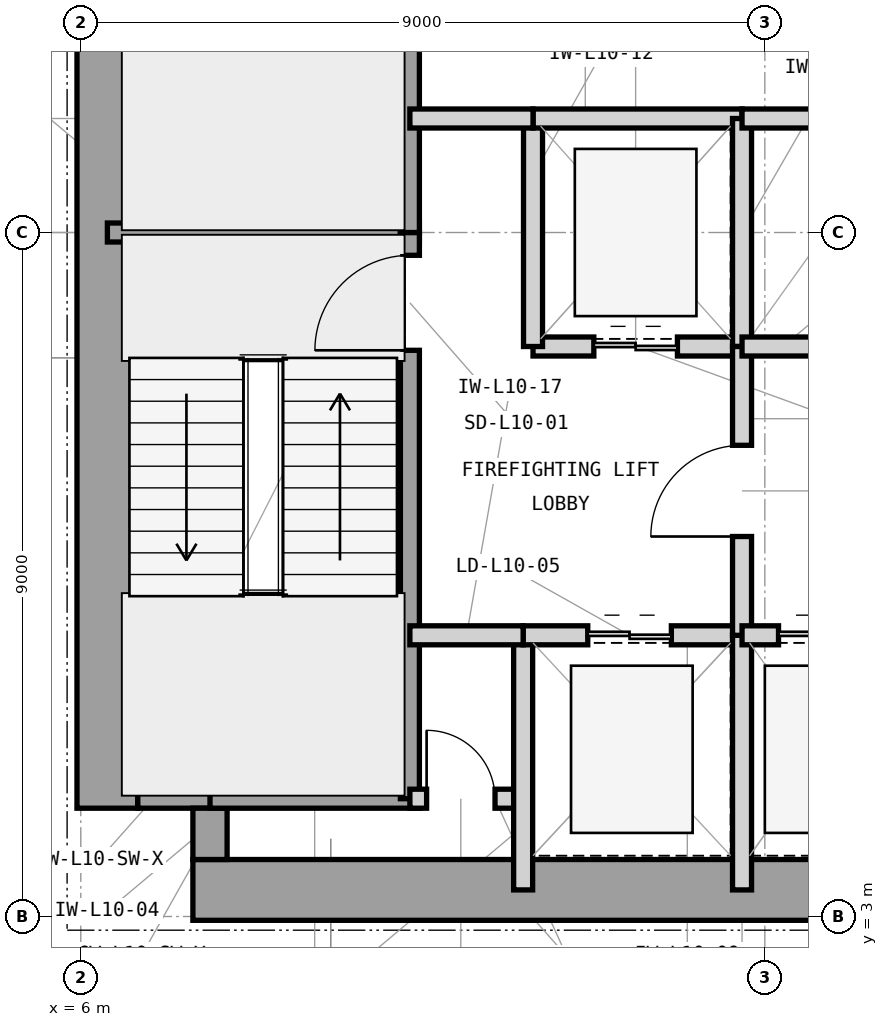
"""IFC4 building model, lengths in metres.
Left out: names, types, materials, properties, quantities, classifications, styles, units other than length and angle.
Written with IfcOpenShell. Run it as: python <this file> out.ifc"""

import sys

from ifc_helpers import new_model, si_unit, direction, frame, frame_2d, origin, place, context, subcontext, project, spatial, rectangle, extrude, element, fill, save


model = new_model("IFC4")
c1 = context("Model", 3, precision=1e-05, world=origin(), true_north=direction((0.0, 1.0)))
c2 = subcontext(c1, "Body", "Model", "MODEL_VIEW")
j1 = project(units=[si_unit("LENGTHUNIT", "METRE"), si_unit("PLANEANGLEUNIT", "RADIAN")], contexts=[c1])
p1 = place(None, origin())
s1 = spatial("IfcSite", under=j1, at=p1, CompositionType="ELEMENT")
p2 = place(p1, origin())
s2 = spatial("IfcBuilding", under=s1, at=p2, CompositionType="ELEMENT")
p3 = place(p2, frame((0.0, 0.0, 46.8)))
s3 = spatial("IfcBuildingStorey", under=s2, at=p3, CompositionType="ELEMENT", Elevation=46.8)
p4 = place(p3, frame((7.475, 3.35, 0.0), z_axis=(0.0, 0.0, 1.0), x_axis=(1.0, 0.0, 0.0)))
e1 = element("IfcWall", 1, at=p4, inside=s3, PredefinedType="SHEAR", context=c2, shape_type="SweptSolid", body=[
    extrude(rectangle(XDim=16.575, YDim=0.8, at=frame_2d((8.288, 0.0))), origin(), (0.0, 0.0, 1.0), 4.2),
])
p5 = place(p3, frame((6.35, 4.425, 0.0), z_axis=(0.0, 0.0, 1.0), x_axis=(0.0, 1.0, 0.0)))
e2 = element("IfcWall", 2, at=p5, inside=s3, PredefinedType="SHEAR", context=c2, shape_type="SweptSolid", body=[
    extrude(rectangle(XDim=15.15, YDim=0.8, at=frame_2d((7.575, 0.0))), origin(), (0.0, 0.0, 1.0), 4.2),
])
p6 = place(p3, frame((6.75, 4.65, 0.0), z_axis=(0.0, 0.0, 1.0), x_axis=(1.0, 0.0, 0.0)))
e3 = element("IfcWall", 3, at=p6, inside=s3, PredefinedType="SHEAR", context=c2, shape_type="SweptSolid", body=[
    extrude(rectangle(XDim=1.175, YDim=0.45, at=frame_2d((0.587, 0.0))), origin(), (0.0, 0.0, 1.0), 4.2),
])
p7 = place(p3, frame((7.7, 3.75, 0.0), z_axis=(0.0, 0.0, 1.0), x_axis=(0.0, 1.0, 0.0)))
e4 = element("IfcWall", 4, at=p7, inside=s3, PredefinedType="SHEAR", context=c2, shape_type="SweptSolid", body=[
    extrude(rectangle(XDim=0.675, YDim=0.45, at=frame_2d((0.337, 0.0))), origin(), (0.0, 0.0, 1.0), 4.2),
])
p8 = place(p3, frame((6.35, 12.0, 0.0), z_axis=(0.0, 0.0, 1.0), x_axis=(1.0, 0.0, 0.0)))
e5 = element("IfcWall", 5, at=p8, inside=s3, PredefinedType="SHEAR", context=c2, shape_type="SweptSolid", body=[
    extrude(rectangle(XDim=4.105, YDim=0.25, at=frame_2d((2.052, 0.0))), origin(), (0.0, 0.0, 1.0), 4.2),
])
p9 = place(p3, frame((7.7, 4.55, 0.0), z_axis=(0.0, 0.0, 1.0), x_axis=(1.0, 0.0, 0.0)))
e6 = element("IfcWall", 6, at=p9, inside=s3, PredefinedType="SHEAR", context=c2, shape_type="SweptSolid", body=[
    extrude(rectangle(XDim=2.755, YDim=0.25, at=frame_2d((1.377, 0.0))), origin(), (0.0, 0.0, 1.0), 4.2),
])
p10 = place(p3, frame((10.33, 4.55, 0.0), z_axis=(0.0, 0.0, 1.0), x_axis=(0.0, 1.0, 0.0)))
e7 = element("IfcWall", 7, at=p10, inside=s3, PredefinedType="SHEAR", context=c2, shape_type="SweptSolid", body=[
    extrude(rectangle(XDim=7.45, YDim=0.25, at=frame_2d((3.725, 0.0))), origin(), (0.0, 0.0, 1.0), 4.2),
])
p11 = place(p10, frame((5.9, 0.0, 0.0)))
e8 = element("IfcOpeningElement", 8, at=p11, cuts=e7, PredefinedType="OPENING", context=c2, shape_type="SweptSolid", body=[
    extrude(rectangle(XDim=1.25, YDim=2.2, at=frame_2d((0.625, 1.1))), frame((0.0, 0.135, 0.0), z_axis=(0.0, -1.0, 0.0), x_axis=(1.0, 0.0, 0.0)), (0.0, 0.0, 1.0), 0.27),
])
p12 = place(p3, frame((10.33, 12.0, 0.0), z_axis=(0.0, 0.0, 1.0), x_axis=(0.0, 1.0, 0.0)))
e9 = element("IfcWall", 9, at=p12, inside=s3, PredefinedType="SHEAR", context=c2, shape_type="SweptSolid", body=[
    extrude(rectangle(XDim=7.45, YDim=0.25, at=frame_2d((3.725, 0.0))), origin(), (0.0, 0.0, 1.0), 4.2),
])
p13 = place(p12, frame((5.85, 0.0, 0.0)))
e10 = element("IfcOpeningElement", 10, at=p13, cuts=e9, PredefinedType="OPENING", context=c2, shape_type="SweptSolid", body=[
    extrude(rectangle(XDim=1.25, YDim=2.2, at=frame_2d((0.625, 1.1))), frame((0.0, 0.135, 0.0), z_axis=(0.0, -1.0, 0.0), x_axis=(1.0, 0.0, 0.0)), (0.0, 0.0, 1.0), 0.27),
])
p14 = place(p3, frame((10.33, 4.55, 0.0), z_axis=(0.0, 0.0, 1.0), x_axis=(1.0, 0.0, 0.0)))
e11 = element("IfcWall", 11, at=p14, inside=s3, PredefinedType="PARTITIONING", context=c2, shape_type="SweptSolid", body=[
    extrude(rectangle(XDim=1.49, YDim=0.25, at=frame_2d((0.745, 0.0))), origin(), (0.0, 0.0, 1.0), 3.97),
])
p15 = place(p14, frame((0.22, 0.0, 0.0)))
e12 = element("IfcOpeningElement", 12, at=p15, cuts=e11, PredefinedType="OPENING", context=c2, shape_type="SweptSolid", body=[
    extrude(rectangle(XDim=0.9, YDim=2.1, at=frame_2d((0.45, 1.05))), frame((0.0, 0.135, 0.0), z_axis=(0.0, -1.0, 0.0), x_axis=(1.0, 0.0, 0.0)), (0.0, 0.0, 1.0), 0.27),
])
p16 = place(p3, frame((11.82, 3.35, 0.0), z_axis=(0.0, 0.0, 1.0), x_axis=(0.0, 1.0, 0.0)))
e13 = element("IfcWall", 13, at=p16, inside=s3, PredefinedType="PARTITIONING", context=c2, shape_type="SweptSolid", body=[
    extrude(rectangle(XDim=3.35, YDim=0.25, at=frame_2d((1.675, 0.0))), origin(), (0.0, 0.0, 1.0), 3.97),
])
p17 = place(p3, frame((11.82, 6.7, 0.0), z_axis=(0.0, 0.0, 1.0), x_axis=(1.0, 0.0, 0.0)))
e14 = element("IfcWall", 14, at=p17, inside=s3, PredefinedType="PARTITIONING", context=c2, shape_type="SweptSolid", body=[
    extrude(rectangle(XDim=2.88, YDim=0.25, at=frame_2d((1.44, 0.0))), origin(), (0.0, 0.0, 1.0), 3.426),
])
p18 = place(p17, frame((0.85, 0.0, 0.0)))
e15 = element("IfcOpeningElement", 15, at=p18, cuts=e14, PredefinedType="OPENING", context=c2, shape_type="SweptSolid", body=[
    extrude(rectangle(XDim=1.1, YDim=2.25, at=frame_2d((0.55, 1.125))), frame((0.0, 0.135, 0.0), z_axis=(0.0, -1.0, 0.0), x_axis=(1.0, 0.0, 0.0)), (0.0, 0.0, 1.0), 0.27),
])
p19 = place(p3, frame((14.7, 3.35, 0.0), z_axis=(0.0, 0.0, 1.0), x_axis=(0.0, 1.0, 0.0)))
e16 = element("IfcWall", 16, at=p19, inside=s3, PredefinedType="PARTITIONING", context=c2, shape_type="SweptSolid", body=[
    extrude(rectangle(XDim=3.35, YDim=0.25, at=frame_2d((1.675, 0.0))), origin(), (0.0, 0.0, 1.0), 3.97),
])
p20 = place(p3, frame((11.95, 10.5, 0.0), z_axis=(0.0, 0.0, 1.0), x_axis=(1.0, 0.0, 0.0)))
e17 = element("IfcWall", 17, at=p20, inside=s3, PredefinedType="PARTITIONING", context=c2, shape_type="SweptSolid", body=[
    extrude(rectangle(XDim=2.75, YDim=0.25, at=frame_2d((1.375, 0.0))), origin(), (0.0, 0.0, 1.0), 3.426),
])
p21 = place(p20, frame((0.8, 0.0, 0.0)))
e18 = element("IfcOpeningElement", 18, at=p21, cuts=e17, PredefinedType="OPENING", context=c2, shape_type="SweptSolid", body=[
    extrude(rectangle(XDim=1.1, YDim=2.25, at=frame_2d((0.55, 1.125))), frame((0.0, 0.135, 0.0), z_axis=(0.0, -1.0, 0.0), x_axis=(1.0, 0.0, 0.0)), (0.0, 0.0, 1.0), 0.27),
])
p22 = place(p3, frame((11.95, 10.5, 0.0), z_axis=(0.0, 0.0, 1.0), x_axis=(0.0, 1.0, 0.0)))
e19 = element("IfcWall", 19, at=p22, inside=s3, PredefinedType="PARTITIONING", context=c2, shape_type="SweptSolid", body=[
    extrude(rectangle(XDim=3.0, YDim=0.25, at=frame_2d((1.5, 0.0))), origin(), (0.0, 0.0, 1.0), 3.97),
])
p23 = place(p3, frame((11.95, 13.5, 0.0), z_axis=(0.0, 0.0, 1.0), x_axis=(1.0, 0.0, 0.0)))
e20 = element("IfcWall", 20, at=p23, inside=s3, PredefinedType="PARTITIONING", context=c2, shape_type="SweptSolid", body=[
    extrude(rectangle(XDim=2.75, YDim=0.25, at=frame_2d((1.375, 0.0))), origin(), (0.0, 0.0, 1.0), 3.426),
])
p24 = place(p3, frame((14.7, 10.5, 0.0), z_axis=(0.0, 0.0, 1.0), x_axis=(0.0, 1.0, 0.0)))
e21 = element("IfcWall", 21, at=p24, inside=s3, PredefinedType="PARTITIONING", context=c2, shape_type="SweptSolid", body=[
    extrude(rectangle(XDim=3.0, YDim=0.25, at=frame_2d((1.5, 0.0))), origin(), (0.0, 0.0, 1.0), 3.97),
])
p25 = place(p3, frame((14.7, 6.7, 0.0), z_axis=(0.0, 0.0, 1.0), x_axis=(0.0, 1.0, 0.0)))
e22 = element("IfcWall", 22, at=p25, inside=s3, PredefinedType="PARTITIONING", context=c2, shape_type="SweptSolid", body=[
    extrude(rectangle(XDim=3.8, YDim=0.25, at=frame_2d((1.9, 0.0))), origin(), (0.0, 0.0, 1.0), 3.97),
])
p26 = place(p25, frame((1.3, 0.0, 0.0)))
e23 = element("IfcOpeningElement", 23, at=p26, cuts=e22, PredefinedType="OPENING", context=c2, shape_type="SweptSolid", body=[
    extrude(rectangle(XDim=1.2, YDim=2.2, at=frame_2d((0.6, 1.1))), frame((0.0, 0.135, 0.0), z_axis=(0.0, -1.0, 0.0), x_axis=(1.0, 0.0, 0.0)), (0.0, 0.0, 1.0), 0.27),
])
p27 = place(p3, frame((10.33, 13.5, 0.0), z_axis=(0.0, 0.0, 1.0), x_axis=(1.0, 0.0, 0.0)))
e24 = element("IfcWall", 24, at=p27, inside=s3, PredefinedType="PARTITIONING", context=c2, shape_type="SweptSolid", body=[
    extrude(rectangle(XDim=1.62, YDim=0.25, at=frame_2d((0.81, 0.0))), origin(), (0.0, 0.0, 1.0), 3.426),
])
p28 = place(p3, frame((10.33, 6.7, 0.0), z_axis=(0.0, 0.0, 1.0), x_axis=(1.0, 0.0, 0.0)))
e25 = element("IfcWall", 25, at=p28, inside=s3, PredefinedType="PARTITIONING", context=c2, shape_type="SweptSolid", body=[
    extrude(rectangle(XDim=1.49, YDim=0.25, at=frame_2d((0.745, 0.0))), origin(), (0.0, 0.0, 1.0), 3.426),
])
p29 = place(p3, frame((14.7, 6.7, 0.0), z_axis=(0.0, 0.0, 1.0), x_axis=(1.0, 0.0, 0.0)))
e26 = element("IfcWall", 26, at=p29, inside=s3, PredefinedType="PARTITIONING", context=c2, shape_type="SweptSolid", body=[
    extrude(rectangle(XDim=2.15, YDim=0.25, at=frame_2d((1.075, 0.0))), origin(), (0.0, 0.0, 1.0), 3.426),
])
p30 = place(p29, frame((0.48, 0.0, 0.0)))
e27 = element("IfcOpeningElement", 27, at=p30, cuts=e26, PredefinedType="OPENING", context=c2, shape_type="SweptSolid", body=[
    extrude(rectangle(XDim=1.15, YDim=2.25, at=frame_2d((0.575, 1.125))), frame((0.0, 0.135, 0.0), z_axis=(0.0, -1.0, 0.0), x_axis=(1.0, 0.0, 0.0)), (0.0, 0.0, 1.0), 0.27),
])
p31 = place(p3, frame((14.7, 10.5, 0.0), z_axis=(0.0, 0.0, 1.0), x_axis=(1.0, 0.0, 0.0)))
e28 = element("IfcWall", 28, at=p31, inside=s3, PredefinedType="PARTITIONING", context=c2, shape_type="SweptSolid", body=[
    extrude(rectangle(XDim=2.15, YDim=0.25, at=frame_2d((1.075, 0.0))), origin(), (0.0, 0.0, 1.0), 3.426),
])
p32 = place(p3, frame((14.7, 13.5, 0.0), z_axis=(0.0, 0.0, 1.0), x_axis=(1.0, 0.0, 0.0)))
e29 = element("IfcWall", 29, at=p32, inside=s3, PredefinedType="PARTITIONING", context=c2, shape_type="SweptSolid", body=[
    extrude(rectangle(XDim=8.95, YDim=0.25, at=frame_2d((4.475, 0.0))), origin(), (0.0, 0.0, 1.0), 3.426),
])
p33 = place(p11, origin())
e30 = element("IfcDoor", 30, at=p33, inside=s3, OperationType="SINGLE_SWING_LEFT", PredefinedType="DOOR", context=c2, shape_type="SweptSolid", body=[
    extrude(rectangle(XDim=1.25, YDim=2.2, at=frame_2d((0.625, 1.1))), frame((0.0, 0.025, 0.0), z_axis=(0.0, -1.0, 0.0), x_axis=(1.0, 0.0, 0.0)), (0.0, 0.0, 1.0), 0.05),
])
fill(e8, e30)
p34 = place(p15, origin())
e31 = element("IfcDoor", 31, at=p34, inside=s3, OperationType="SINGLE_SWING_LEFT", PredefinedType="TRAPDOOR", context=c2, shape_type="SweptSolid", body=[
    extrude(rectangle(XDim=0.9, YDim=2.1, at=frame_2d((0.45, 1.05))), frame((0.0, 0.025, 0.0), z_axis=(0.0, -1.0, 0.0), x_axis=(1.0, 0.0, 0.0)), (0.0, 0.0, 1.0), 0.05),
])
fill(e12, e31)
p35 = place(p18, origin())
e32 = element("IfcDoor", 32, at=p35, inside=s3, OperationType="DOUBLE_DOOR_SLIDING", PredefinedType="DOOR", context=c2, shape_type="SweptSolid", body=[
    extrude(rectangle(XDim=1.1, YDim=2.25, at=frame_2d((0.55, 1.125))), frame((0.0, 0.025, 0.0), z_axis=(0.0, -1.0, 0.0), x_axis=(1.0, 0.0, 0.0)), (0.0, 0.0, 1.0), 0.05),
])
fill(e15, e32)
p36 = place(p21, origin())
e33 = element("IfcDoor", 33, at=p36, inside=s3, OperationType="DOUBLE_DOOR_SLIDING", PredefinedType="DOOR", context=c2, shape_type="SweptSolid", body=[
    extrude(rectangle(XDim=1.1, YDim=2.25, at=frame_2d((0.55, 1.125))), frame((0.0, 0.025, 0.0), z_axis=(0.0, -1.0, 0.0), x_axis=(1.0, 0.0, 0.0)), (0.0, 0.0, 1.0), 0.05),
])
fill(e18, e33)
p37 = place(p26, origin())
e34 = element("IfcDoor", 34, at=p37, inside=s3, OperationType="SINGLE_SWING_LEFT", PredefinedType="DOOR", context=c2, shape_type="SweptSolid", body=[
    extrude(rectangle(XDim=1.2, YDim=2.2, at=frame_2d((0.6, 1.1))), frame((0.0, 0.025, 0.0), z_axis=(0.0, -1.0, 0.0), x_axis=(1.0, 0.0, 0.0)), (0.0, 0.0, 1.0), 0.05),
])
fill(e23, e34)
p38 = place(p30, origin())
e35 = element("IfcDoor", 35, at=p38, inside=s3, OperationType="DOUBLE_DOOR_SLIDING", PredefinedType="DOOR", context=c2, shape_type="SweptSolid", body=[
    extrude(rectangle(XDim=1.15, YDim=2.25, at=frame_2d((0.575, 1.125))), frame((0.0, 0.025, 0.0), z_axis=(0.0, -1.0, 0.0), x_axis=(1.0, 0.0, 0.0)), (0.0, 0.0, 1.0), 0.05),
])
fill(e27, e35)
save(model, sys.argv[1])
